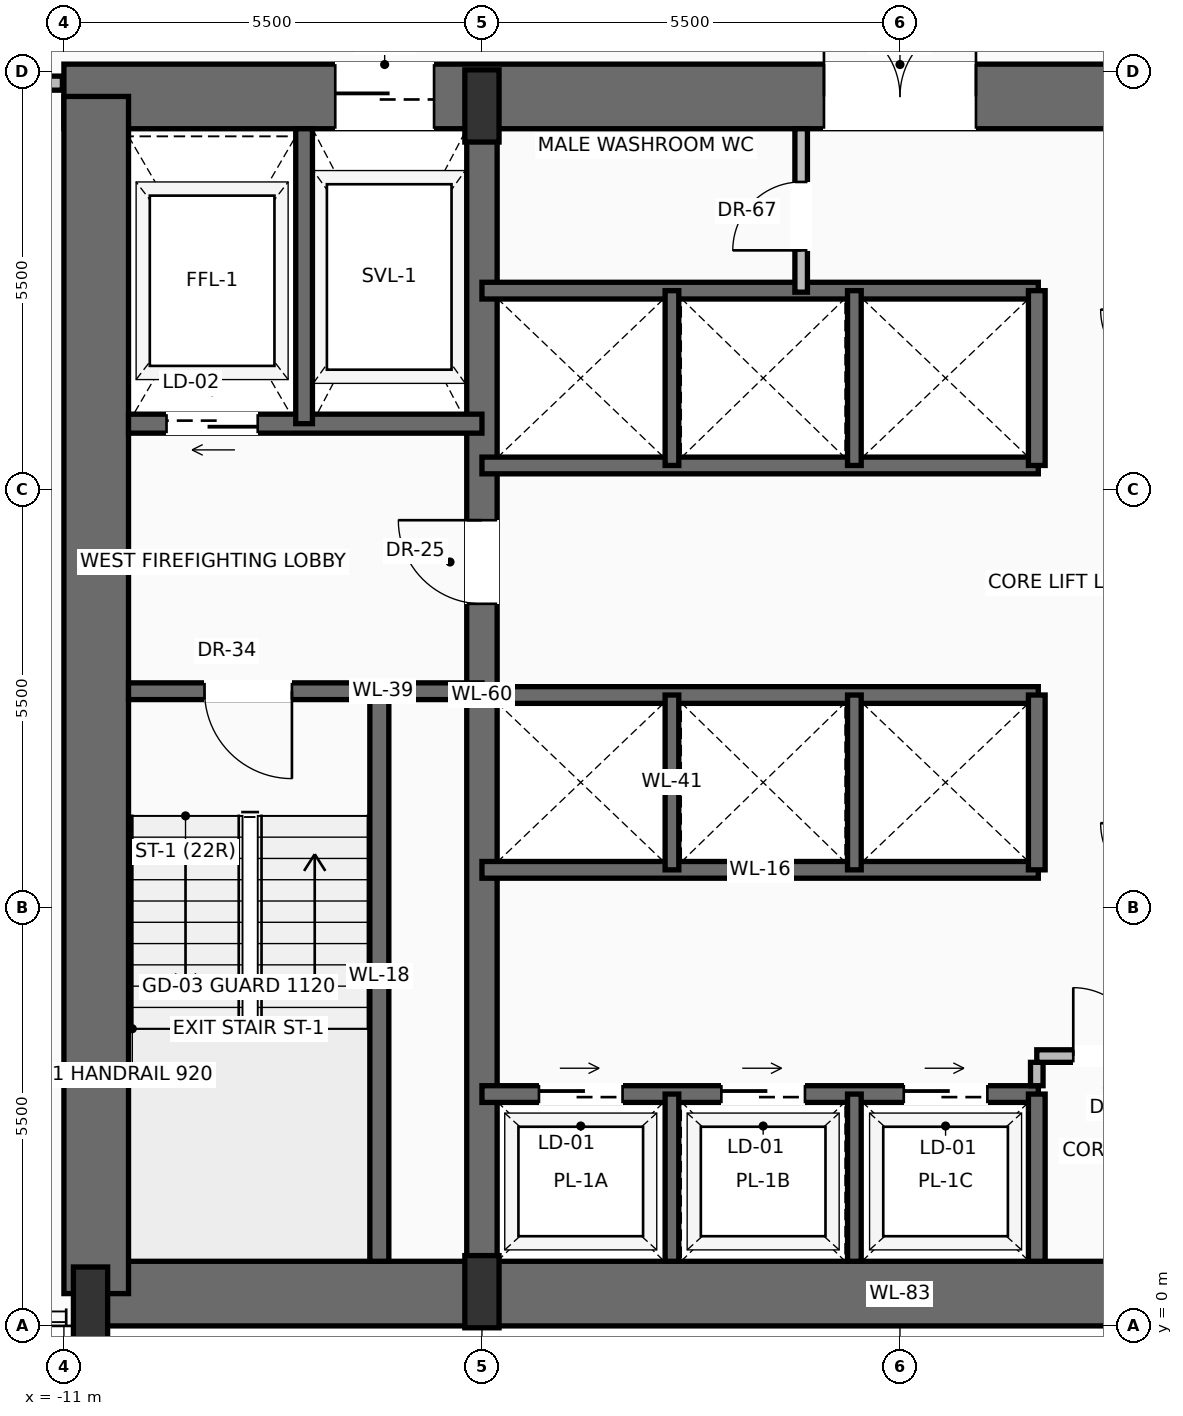
"""IFC4 building model, lengths in metres.
Left out: names, types, materials, properties, quantities, classifications, styles, units other than length and angle.
Written with IfcOpenShell. Run it as: python <this file> out.ifc"""

import sys

from ifc_helpers import new_model, si_unit, direction, frame, frame_2d, origin, origin_2d, place, context, subcontext, project, spatial, rectangle, extrude, source, transform, mapped, element, fill, save


model = new_model("IFC4")
c1 = context("Model", 3, precision=1e-05, world=origin(), true_north=direction((0.0, 1.0)))
c2 = subcontext(c1, "Body", "Model", "MODEL_VIEW")
j1 = project(units=[si_unit("LENGTHUNIT", "METRE"), si_unit("PLANEANGLEUNIT", "RADIAN")], contexts=[c1])
p1 = place(None, origin())
s1 = spatial("IfcSite", under=j1, at=p1, CompositionType="ELEMENT")
p2 = place(p1, origin())
s2 = spatial("IfcBuilding", under=s1, at=p2, CompositionType="ELEMENT")
p3 = place(p2, frame((0.0, 0.0, 31.2)))
s3 = spatial("IfcBuildingStorey", under=s2, at=p3, CompositionType="ELEMENT", Elevation=31.2)
p4 = place(p3, frame((-10.65, 0.425, 0.0), z_axis=(0.0, 0.0, 1.0), x_axis=(1.0, 0.0, 0.0)))
e1 = element("IfcWall", 1, at=p4, inside=s3, PredefinedType="SHEAR", context=c2, shape_type="SweptSolid", body=[
    extrude(rectangle(XDim=21.3, YDim=0.85, at=frame_2d((10.65, 0.0))), origin(), (0.0, 0.0, 1.0), 3.45),
])
p5 = place(p3, frame((-11.0, 16.175, 0.0), z_axis=(0.0, 0.0, 1.0), x_axis=(1.0, 0.0, 0.0)))
e2 = element("IfcWall", 2, at=p5, inside=s3, PredefinedType="SHEAR", context=c2, shape_type="SweptSolid", body=[
    extrude(rectangle(XDim=22.0, YDim=0.85, at=frame_2d((11.0, 0.0))), origin(), (0.0, 0.0, 1.0), 3.45),
])
p6 = place(p5, frame((3.57, 0.0, 0.0)))
e3 = element("IfcOpeningElement", 3, at=p6, cuts=e2, PredefinedType="OPENING", context=c2, shape_type="SweptSolid", body=[
    extrude(rectangle(XDim=1.3, YDim=2.3, at=frame_2d((0.65, 1.15))), frame((0.0, 0.435, 0.0), z_axis=(0.0, -1.0, 0.0), x_axis=(1.0, 0.0, 0.0)), (0.0, 0.0, 1.0), 0.87),
])
p7 = place(p5, frame((10.0, 0.0, 0.0)))
e4 = element("IfcOpeningElement", 4, at=p7, cuts=e2, PredefinedType="OPENING", context=c2, shape_type="SweptSolid", body=[
    extrude(rectangle(XDim=2.0, YDim=2.4, at=frame_2d((1.0, 1.2))), frame((0.0, 0.435, 0.0), z_axis=(0.0, -1.0, 0.0), x_axis=(1.0, 0.0, 0.0)), (0.0, 0.0, 1.0), 0.87),
])
p8 = place(p3, frame((-10.575, 0.425, 0.0), z_axis=(0.0, 0.0, 1.0), x_axis=(0.0, 1.0, 0.0)))
e5 = element("IfcWall", 5, at=p8, inside=s3, PredefinedType="SHEAR", context=c2, shape_type="SweptSolid", body=[
    extrude(rectangle(XDim=15.75, YDim=0.85, at=frame_2d((7.875, 0.0))), origin(), (0.0, 0.0, 1.0), 3.45),
])
p9 = place(p3, frame((-5.5, 0.425, 0.0), z_axis=(0.0, 0.0, 1.0), x_axis=(0.0, 1.0, 0.0)))
e6 = element("IfcWall", 6, at=p9, inside=s3, PredefinedType="SHEAR", context=c2, shape_type="SweptSolid", body=[
    extrude(rectangle(XDim=15.75, YDim=0.4, at=frame_2d((7.875, 0.0))), origin(), (0.0, 0.0, 1.0), 3.45),
])
p10 = place(p9, frame((9.075, 0.0, 0.0)))
e7 = element("IfcOpeningElement", 7, at=p10, cuts=e6, PredefinedType="OPENING", context=c2, shape_type="SweptSolid", body=[
    extrude(rectangle(XDim=1.1, YDim=2.2, at=frame_2d((0.55, 1.1))), frame((0.0, 0.21, 0.0), z_axis=(0.0, -1.0, 0.0), x_axis=(1.0, 0.0, 0.0)), (0.0, 0.0, 1.0), 0.42),
])
m1 = source(origin(), c2, "Body", "SweptSolid", [
    extrude(rectangle(XDim=0.45, YDim=0.95, at=origin_2d()), origin(), (0.0, 0.0, 1.0), 3.7),
])
for number, where, z_axis, x_axis in (
    (8, (-10.65, 0.3, 0.0), (0.0, 0.0, 1.0), (1.0, 0.0, 0.0)),
    (9, (-5.5, 0.45, 0.0), (0.0, 0.0, 1.0), (1.0, 0.0, 0.0)),
    (10, (-5.5, 16.05, 0.0), (0.0, 0.0, 1.0), (1.0, 0.0, 0.0)),
):
    element("IfcColumn", number, at=place(p3, frame(where, z_axis=z_axis, x_axis=x_axis)), inside=s3, PredefinedType="PILASTER", context=c2, shape_type="MappedRepresentation", body=[
        mapped(m1, transform((0.0, 0.0, 0.0), scale=1.0)),
    ])
p11 = place(p3, frame((-6.85, 0.85, 0.0), z_axis=(0.0, 0.0, 1.0), x_axis=(0.0, 1.0, 0.0)))
e11 = element("IfcWall", 11, at=p11, inside=s3, PredefinedType="SOLIDWALL", context=c2, shape_type="SweptSolid", body=[
    extrude(rectangle(XDim=7.5, YDim=0.25, at=frame_2d((3.75, 0.0))), origin(), (0.0, 0.0, 1.0), 3.45),
])
p12 = place(p3, frame((-5.5, 8.35, 0.0), z_axis=(0.0, 0.0, 1.0), x_axis=(-1.0, 0.0, 0.0)))
e12 = element("IfcWall", 12, at=p12, inside=s3, PredefinedType="SOLIDWALL", context=c2, shape_type="SweptSolid", body=[
    extrude(rectangle(XDim=4.65, YDim=0.22, at=frame_2d((2.325, 0.0))), origin(), (0.0, 0.0, 1.0), 3.45),
])
p13 = place(p12, frame((2.5, 0.0, 0.0)))
e13 = element("IfcOpeningElement", 13, at=p13, cuts=e12, PredefinedType="OPENING", context=c2, shape_type="SweptSolid", body=[
    extrude(rectangle(XDim=1.15, YDim=2.2, at=frame_2d((0.575, 1.1))), frame((0.0, 0.12, 0.0), z_axis=(0.0, -1.0, 0.0), x_axis=(1.0, 0.0, 0.0)), (0.0, 0.0, 1.0), 0.24),
])
p14 = place(p3, frame((-5.5, 11.87, 0.0), z_axis=(0.0, 0.0, 1.0), x_axis=(-1.0, 0.0, 0.0)))
e14 = element("IfcWall", 14, at=p14, inside=s3, PredefinedType="SOLIDWALL", context=c2, shape_type="SweptSolid", body=[
    extrude(rectangle(XDim=4.65, YDim=0.25, at=frame_2d((2.325, 0.0))), origin(), (0.0, 0.0, 1.0), 3.45),
])
p15 = place(p14, frame((2.95, 0.0, 0.0)))
e15 = element("IfcOpeningElement", 15, at=p15, cuts=e14, PredefinedType="OPENING", context=c2, shape_type="SweptSolid", body=[
    extrude(rectangle(XDim=1.2, YDim=2.25, at=frame_2d((0.6, 1.125))), frame((0.0, 0.135, 0.0), z_axis=(0.0, -1.0, 0.0), x_axis=(1.0, 0.0, 0.0)), (0.0, 0.0, 1.0), 0.27),
])
p16 = place(p3, frame((-7.84, 11.87, 0.0), z_axis=(0.0, 0.0, 1.0), x_axis=(0.0, 1.0, 0.0)))
e16 = element("IfcWall", 16, at=p16, inside=s3, PredefinedType="SOLIDWALL", context=c2, shape_type="SweptSolid", body=[
    extrude(rectangle(XDim=3.88, YDim=0.22, at=frame_2d((1.94, 0.0))), origin(), (0.0, 0.0, 1.0), 3.45),
])
p17 = place(p3, frame((-5.5, 3.05, 0.0), z_axis=(0.0, 0.0, 1.0), x_axis=(1.0, 0.0, 0.0)))
e17 = element("IfcWall", 17, at=p17, inside=s3, PredefinedType="SOLIDWALL", context=c2, shape_type="SweptSolid", body=[
    extrude(rectangle(XDim=7.32, YDim=0.22, at=frame_2d((3.66, 0.0))), origin(), (0.0, 0.0, 1.0), 3.45),
])
p18 = place(p17, frame((0.75, 0.0, 0.0)))
e18 = element("IfcOpeningElement", 18, at=p18, cuts=e17, PredefinedType="OPENING", context=c2, shape_type="SweptSolid", body=[
    extrude(rectangle(XDim=1.1, YDim=2.2, at=frame_2d((0.55, 1.1))), frame((0.0, 0.12, 0.0), z_axis=(0.0, -1.0, 0.0), x_axis=(1.0, 0.0, 0.0)), (0.0, 0.0, 1.0), 0.24),
])
p19 = place(p17, frame((3.15, 0.0, 0.0)))
e19 = element("IfcOpeningElement", 19, at=p19, cuts=e17, PredefinedType="OPENING", context=c2, shape_type="SweptSolid", body=[
    extrude(rectangle(XDim=1.1, YDim=2.2, at=frame_2d((0.55, 1.1))), frame((0.0, 0.12, 0.0), z_axis=(0.0, -1.0, 0.0), x_axis=(1.0, 0.0, 0.0)), (0.0, 0.0, 1.0), 0.24),
])
p20 = place(p17, frame((5.55, 0.0, 0.0)))
e20 = element("IfcOpeningElement", 20, at=p20, cuts=e17, PredefinedType="OPENING", context=c2, shape_type="SweptSolid", body=[
    extrude(rectangle(XDim=1.1, YDim=2.2, at=frame_2d((0.55, 1.1))), frame((0.0, 0.12, 0.0), z_axis=(0.0, -1.0, 0.0), x_axis=(1.0, 0.0, 0.0)), (0.0, 0.0, 1.0), 0.24),
])
p21 = place(p3, frame((1.8, 0.85, 0.0), z_axis=(0.0, 0.0, 1.0), x_axis=(0.0, 1.0, 0.0)))
e21 = element("IfcWall", 21, at=p21, inside=s3, PredefinedType="SOLIDWALL", context=c2, shape_type="SweptSolid", body=[
    extrude(rectangle(XDim=2.2, YDim=0.22, at=frame_2d((1.1, 0.0))), origin(), (0.0, 0.0, 1.0), 3.45),
])
for number, where, z_axis, x_axis in (
    (22, (-3.0, 0.85, 0.0), (0.0, 0.0, 1.0), (0.0, 1.0, 0.0)),
    (23, (-0.6, 0.85, 0.0), (0.0, 0.0, 1.0), (0.0, 1.0, 0.0)),
):
    element("IfcWall", number, at=place(p3, frame(where, z_axis=z_axis, x_axis=x_axis)), inside=s3, PredefinedType="SOLIDWALL", context=c2, shape_type="SweptSolid", body=[
        extrude(rectangle(XDim=2.2, YDim=0.18, at=frame_2d((1.1, 0.0))), origin(), (0.0, 0.0, 1.0), 3.45),
    ])
p22 = place(p3, frame((1.8, 3.16, 0.0), z_axis=(0.0, 0.0, 1.0), x_axis=(0.0, 1.0, 0.0)))
e24 = element("IfcWall", 24, at=p22, inside=s3, PredefinedType="PARTITIONING", context=c2, shape_type="SweptSolid", body=[
    extrude(rectangle(XDim=0.308, YDim=0.165, at=frame_2d((0.154, 0.0))), origin(), (0.0, 0.0, 1.0), 3.442),
])
p23 = place(p3, frame((1.8, 3.55, 0.0), z_axis=(0.0, 0.0, 1.0), x_axis=(1.0, 0.0, 0.0)))
e25 = element("IfcWall", 25, at=p23, inside=s3, PredefinedType="PARTITIONING", context=c2, shape_type="SweptSolid", body=[
    extrude(rectangle(XDim=3.62, YDim=0.165, at=frame_2d((1.81, 0.0))), origin(), (0.0, 0.0, 1.0), 3.442),
])
p24 = place(p23, frame((0.48, 0.0, 0.0)))
e26 = element("IfcOpeningElement", 26, at=p24, cuts=e25, PredefinedType="OPENING", context=c2, shape_type="SweptSolid", body=[
    extrude(rectangle(XDim=0.9, YDim=2.1, at=frame_2d((0.45, 1.05))), frame((0.0, 0.093, 0.0), z_axis=(0.0, -1.0, 0.0), x_axis=(1.0, 0.0, 0.0)), (0.0, 0.0, 1.0), 0.185),
])
for number, where, z_axis, x_axis in (
    (27, (-5.5, 6.0, 0.0), (0.0, 0.0, 1.0), (1.0, 0.0, 0.0)),
    (28, (-5.5, 8.3, 0.0), (0.0, 0.0, 1.0), (1.0, 0.0, 0.0)),
):
    element("IfcWall", number, at=place(p3, frame(where, z_axis=z_axis, x_axis=x_axis)), inside=s3, PredefinedType="SOLIDWALL", context=c2, shape_type="SweptSolid", body=[
        extrude(rectangle(XDim=7.32, YDim=0.22, at=frame_2d((3.66, 0.0))), origin(), (0.0, 0.0, 1.0), 3.45),
    ])
p25 = place(p3, frame((1.8, 6.0, 0.0), z_axis=(0.0, 0.0, 1.0), x_axis=(0.0, 1.0, 0.0)))
e29 = element("IfcWall", 29, at=p25, inside=s3, PredefinedType="SOLIDWALL", context=c2, shape_type="SweptSolid", body=[
    extrude(rectangle(XDim=2.3, YDim=0.22, at=frame_2d((1.15, 0.0))), origin(), (0.0, 0.0, 1.0), 3.45),
])
for number, where, z_axis, x_axis in (
    (30, (-3.0, 6.0, 0.0), (0.0, 0.0, 1.0), (0.0, 1.0, 0.0)),
    (31, (-0.6, 6.0, 0.0), (0.0, 0.0, 1.0), (0.0, 1.0, 0.0)),
):
    element("IfcWall", number, at=place(p3, frame(where, z_axis=z_axis, x_axis=x_axis)), inside=s3, PredefinedType="SOLIDWALL", context=c2, shape_type="SweptSolid", body=[
        extrude(rectangle(XDim=2.3, YDim=0.18, at=frame_2d((1.15, 0.0))), origin(), (0.0, 0.0, 1.0), 3.45),
    ])
for number, where, z_axis, x_axis in (
    (32, (-5.5, 11.32, 0.0), (0.0, 0.0, 1.0), (1.0, 0.0, 0.0)),
    (33, (-5.5, 13.62, 0.0), (0.0, 0.0, 1.0), (1.0, 0.0, 0.0)),
):
    element("IfcWall", number, at=place(p3, frame(where, z_axis=z_axis, x_axis=x_axis)), inside=s3, PredefinedType="SOLIDWALL", context=c2, shape_type="SweptSolid", body=[
        extrude(rectangle(XDim=7.32, YDim=0.22, at=frame_2d((3.66, 0.0))), origin(), (0.0, 0.0, 1.0), 3.45),
    ])
p26 = place(p3, frame((1.8, 11.32, 0.0), z_axis=(0.0, 0.0, 1.0), x_axis=(0.0, 1.0, 0.0)))
e34 = element("IfcWall", 34, at=p26, inside=s3, PredefinedType="SOLIDWALL", context=c2, shape_type="SweptSolid", body=[
    extrude(rectangle(XDim=2.3, YDim=0.22, at=frame_2d((1.15, 0.0))), origin(), (0.0, 0.0, 1.0), 3.45),
])
for number, where, z_axis, x_axis in (
    (35, (-3.0, 11.32, 0.0), (0.0, 0.0, 1.0), (0.0, 1.0, 0.0)),
    (36, (-0.6, 11.32, 0.0), (0.0, 0.0, 1.0), (0.0, 1.0, 0.0)),
):
    element("IfcWall", number, at=place(p3, frame(where, z_axis=z_axis, x_axis=x_axis)), inside=s3, PredefinedType="SOLIDWALL", context=c2, shape_type="SweptSolid", body=[
        extrude(rectangle(XDim=2.3, YDim=0.18, at=frame_2d((1.15, 0.0))), origin(), (0.0, 0.0, 1.0), 3.45),
    ])
p27 = place(p3, frame((-1.3, 13.6, 0.0), z_axis=(0.0, 0.0, 1.0), x_axis=(0.0, 1.0, 0.0)))
e37 = element("IfcWall", 37, at=p27, inside=s3, PredefinedType="PARTITIONING", context=c2, shape_type="SweptSolid", body=[
    extrude(rectangle(XDim=2.15, YDim=0.165, at=frame_2d((1.075, 0.0))), origin(), (0.0, 0.0, 1.0), 3.442),
])
p28 = place(p27, frame((0.55, 0.0, 0.0)))
e38 = element("IfcOpeningElement", 38, at=p28, cuts=e37, PredefinedType="OPENING", context=c2, shape_type="SweptSolid", body=[
    extrude(rectangle(XDim=0.9, YDim=2.1, at=frame_2d((0.45, 1.05))), frame((0.0, 0.093, 0.0), z_axis=(0.0, -1.0, 0.0), x_axis=(1.0, 0.0, 0.0)), (0.0, 0.0, 1.0), 0.185),
])
p29 = place(p3, frame((-25.199, 16.35, 0.0), z_axis=(0.0, 0.0, 1.0), x_axis=(1.0, 0.0, 0.0)))
e39 = element("IfcWall", 39, at=p29, inside=s3, PredefinedType="PARTITIONING", context=c2, shape_type="SweptSolid", body=[
    extrude(rectangle(XDim=14.179, YDim=0.185, at=frame_2d((7.089, 0.0))), origin(), (0.0, 0.0, 1.0), 2.747),
])
p30 = place(p29, frame((5.939, 0.0, 0.0)))
e40 = element("IfcOpeningElement", 40, at=p30, cuts=e39, PredefinedType="OPENING", context=c2, shape_type="SweptSolid", body=[
    extrude(rectangle(XDim=0.95, YDim=2.2, at=frame_2d((0.475, 1.1))), frame((0.0, 0.103, 0.0), z_axis=(0.0, -1.0, 0.0), x_axis=(1.0, 0.0, 0.0)), (0.0, 0.0, 1.0), 0.205),
])
m2 = source(origin(), c2, "Body", "SweptSolid", [
    extrude(rectangle(XDim=1.15, YDim=2.2, at=frame_2d((0.575, 1.1))), frame((0.0, 0.025, 0.0), z_axis=(0.0, -1.0, 0.0), x_axis=(1.0, 0.0, 0.0)), (0.0, 0.0, 1.0), 0.05),
])
p31 = place(p13, origin())
e41 = element("IfcDoor", 41, at=p31, inside=s3, OperationType="SINGLE_SWING_LEFT", PredefinedType="DOOR", context=c2, shape_type="MappedRepresentation", body=[
    mapped(m2, transform((0.0, 0.0, 0.0), scale=1.0)),
])
fill(e13, e41)
m3 = source(origin(), c2, "Body", "SweptSolid", [
    extrude(rectangle(XDim=1.1, YDim=2.2, at=frame_2d((0.55, 1.1))), frame((0.0, 0.025, 0.0), z_axis=(0.0, -1.0, 0.0), x_axis=(1.0, 0.0, 0.0)), (0.0, 0.0, 1.0), 0.05),
])
p32 = place(p10, origin())
e42 = element("IfcDoor", 42, at=p32, inside=s3, OperationType="SINGLE_SWING_RIGHT", PredefinedType="DOOR", context=c2, shape_type="MappedRepresentation", body=[
    mapped(m3, transform((0.0, 0.0, 0.0), scale=1.0)),
])
fill(e7, e42)
m4 = source(origin(), c2, "Body", "SweptSolid", [
    extrude(rectangle(XDim=1.2, YDim=2.25, at=frame_2d((0.6, 1.125))), frame((0.0, 0.025, 0.0), z_axis=(0.0, -1.0, 0.0), x_axis=(1.0, 0.0, 0.0)), (0.0, 0.0, 1.0), 0.05),
])
p33 = place(p15, origin())
e43 = element("IfcDoor", 43, at=p33, inside=s3, OperationType="SLIDING_TO_LEFT", PredefinedType="DOOR", context=c2, shape_type="MappedRepresentation", body=[
    mapped(m4, transform((0.0, 0.0, 0.0), scale=1.0)),
])
fill(e15, e43)
m5 = source(origin(), c2, "Body", "SweptSolid", [
    extrude(rectangle(XDim=1.3, YDim=2.3, at=frame_2d((0.65, 1.15))), frame((0.0, 0.025, 0.0), z_axis=(0.0, -1.0, 0.0), x_axis=(1.0, 0.0, 0.0)), (0.0, 0.0, 1.0), 0.05),
])
p34 = place(p6, origin())
e44 = element("IfcDoor", 44, at=p34, inside=s3, OperationType="SLIDING_TO_RIGHT", PredefinedType="DOOR", context=c2, shape_type="MappedRepresentation", body=[
    mapped(m5, transform((0.0, 0.0, 0.0), scale=1.0)),
])
fill(e3, e44)
m6 = source(origin(), c2, "Body", "SweptSolid", [
    extrude(rectangle(XDim=2.0, YDim=2.4, at=frame_2d((1.0, 1.2))), frame((0.0, 0.025, 0.0), z_axis=(0.0, -1.0, 0.0), x_axis=(1.0, 0.0, 0.0)), (0.0, 0.0, 1.0), 0.05),
])
p35 = place(p7, origin())
e45 = element("IfcDoor", 45, at=p35, inside=s3, OperationType="DOUBLE_DOOR_SINGLE_SWING", PredefinedType="DOOR", context=c2, shape_type="MappedRepresentation", body=[
    mapped(m6, transform((0.0, 0.0, 0.0), scale=1.0)),
])
fill(e4, e45)
m7 = source(origin(), c2, "Body", "SweptSolid", [
    extrude(rectangle(XDim=1.1, YDim=2.2, at=frame_2d((0.55, 1.1))), frame((0.0, 0.025, 0.0), z_axis=(0.0, -1.0, 0.0), x_axis=(1.0, 0.0, 0.0)), (0.0, 0.0, 1.0), 0.05),
])
p36 = place(p18, origin())
e46 = element("IfcDoor", 46, at=p36, inside=s3, OperationType="SLIDING_TO_RIGHT", PredefinedType="DOOR", context=c2, shape_type="MappedRepresentation", body=[
    mapped(m7, transform((0.0, 0.0, 0.0), scale=1.0)),
])
fill(e18, e46)
p37 = place(p19, origin())
e47 = element("IfcDoor", 47, at=p37, inside=s3, OperationType="SLIDING_TO_RIGHT", PredefinedType="DOOR", context=c2, shape_type="MappedRepresentation", body=[
    mapped(m7, transform((0.0, 0.0, 0.0), scale=1.0)),
])
fill(e19, e47)
p38 = place(p20, origin())
e48 = element("IfcDoor", 48, at=p38, inside=s3, OperationType="SLIDING_TO_RIGHT", PredefinedType="DOOR", context=c2, shape_type="MappedRepresentation", body=[
    mapped(m7, transform((0.0, 0.0, 0.0), scale=1.0)),
])
fill(e20, e48)
m8 = source(origin(), c2, "Body", "SweptSolid", [
    extrude(rectangle(XDim=0.9, YDim=2.1, at=frame_2d((0.45, 1.05))), frame((0.0, 0.025, 0.0), z_axis=(0.0, -1.0, 0.0), x_axis=(1.0, 0.0, 0.0)), (0.0, 0.0, 1.0), 0.05),
])
p39 = place(p24, origin())
e49 = element("IfcDoor", 49, at=p39, inside=s3, OperationType="SINGLE_SWING_LEFT", PredefinedType="DOOR", context=c2, shape_type="MappedRepresentation", body=[
    mapped(m8, transform((0.0, 0.0, 0.0), scale=1.0)),
])
fill(e26, e49)
p40 = place(p28, origin())
e50 = element("IfcDoor", 50, at=p40, inside=s3, OperationType="SINGLE_SWING_LEFT", PredefinedType="DOOR", context=c2, shape_type="MappedRepresentation", body=[
    mapped(m8, transform((0.0, 0.0, 0.0), scale=1.0)),
])
fill(e38, e50)
save(model, sys.argv[1])
